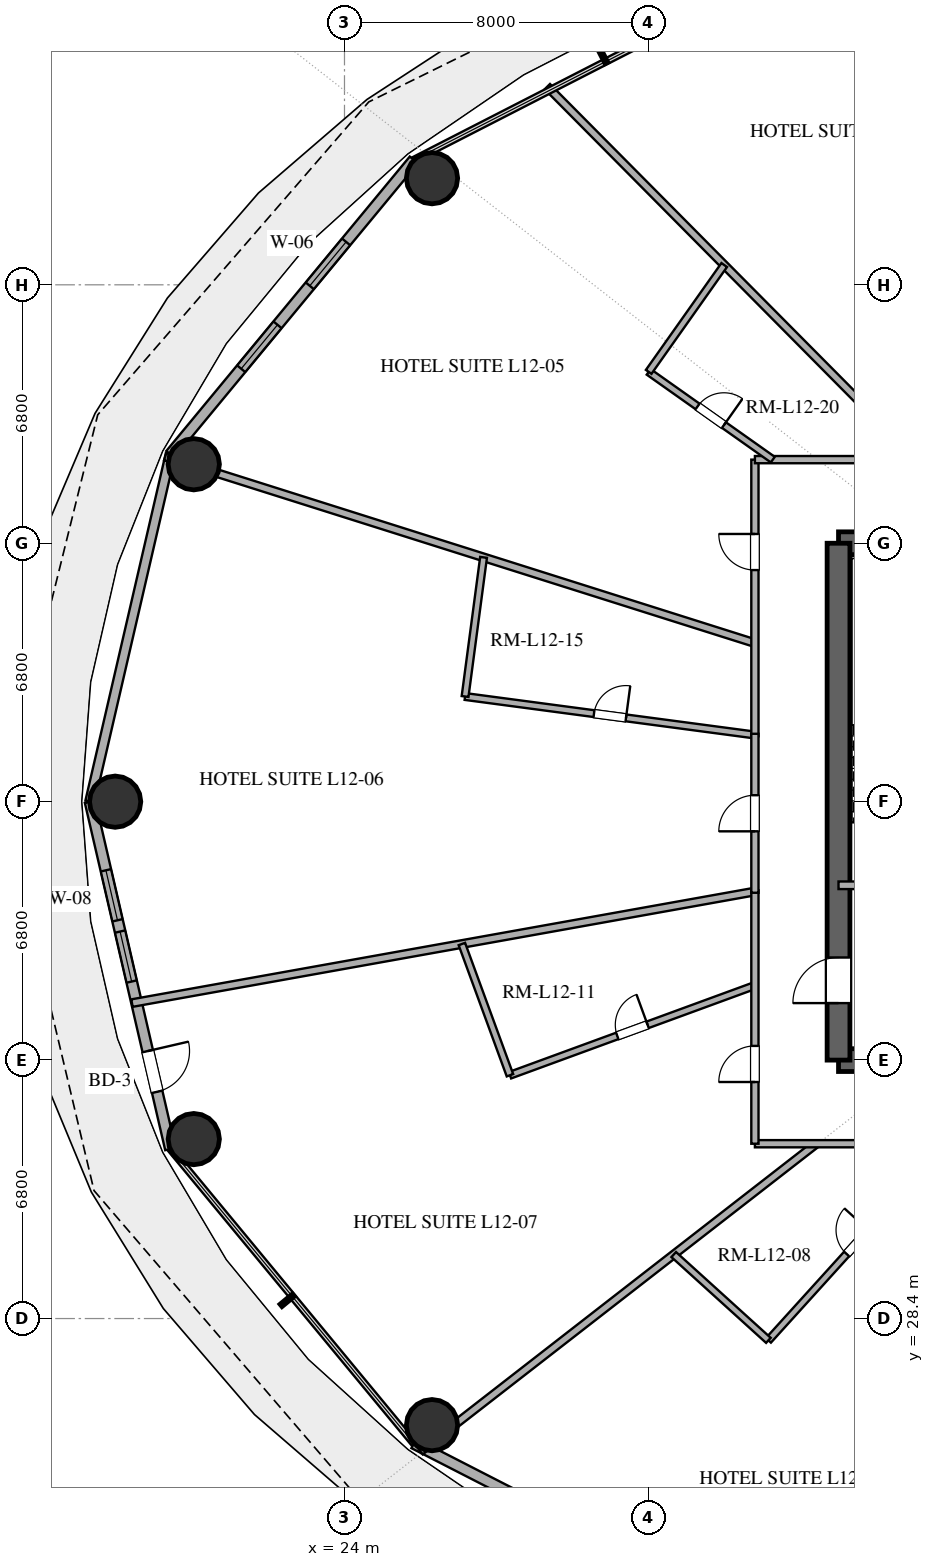
"""IFC4 building model, lengths in metres.
Left out: names, types, materials, properties, quantities, classifications, styles, units other than length and angle.
Written with IfcOpenShell. Run it as: python <this file> out.ifc"""

import sys

from ifc_helpers import new_model, si_unit, direction, frame, frame_2d, origin, origin_2d, place, context, subcontext, project, spatial, rectangle, hollow_circle, extrude, element, fill, save


model = new_model("IFC4")
c1 = context("Model", 3, precision=1e-05, world=origin(), true_north=direction((0.0, 1.0)))
c2 = subcontext(c1, "Body", "Model", "MODEL_VIEW")
j1 = project(units=[si_unit("LENGTHUNIT", "METRE"), si_unit("PLANEANGLEUNIT", "RADIAN")], contexts=[c1])
p1 = place(None, origin())
s1 = spatial("IfcSite", under=j1, at=p1, CompositionType="ELEMENT")
p2 = place(p1, origin())
s2 = spatial("IfcBuilding", under=s1, at=p2, CompositionType="ELEMENT")
p3 = place(p2, frame((0.0, 0.0, 53.4)))
s3 = spatial("IfcBuildingStorey", under=s2, at=p3, CompositionType="ELEMENT", Elevation=53.4)
for number, where, z_axis, x_axis in (
    (1, (37.0, 35.2, 0.0), (0.0, 0.0, 1.0), (1.0, 0.0, 0.0)),
    (2, (37.0, 48.8, 0.0), (0.0, 0.0, 1.0), (1.0, 0.0, 0.0)),
):
    element("IfcWall", number, at=place(p3, frame(where, z_axis=z_axis, x_axis=x_axis)), inside=s3, PredefinedType="SHEAR", context=c2, shape_type="SweptSolid", body=[
        extrude(rectangle(XDim=4.0, YDim=0.6, at=frame_2d((2.0, 0.0))), origin(), (0.0, 0.0, 1.0), 3.38),
    ])
p4 = place(p3, frame((37.0, 35.2, 0.0), z_axis=(0.0, 0.0, 1.0), x_axis=(0.0, 1.0, 0.0)))
e3 = element("IfcWall", 3, at=p4, inside=s3, PredefinedType="SHEAR", context=c2, shape_type="SweptSolid", body=[
    extrude(rectangle(XDim=13.6, YDim=0.6, at=frame_2d((6.8, 0.0))), origin(), (0.0, 0.0, 1.0), 3.38),
])
p5 = place(p4, frame((1.5, 0.0, 0.0)))
e4 = element("IfcOpeningElement", 4, at=p5, cuts=e3, PredefinedType="OPENING", context=c2, shape_type="SweptSolid", body=[
    extrude(rectangle(XDim=1.2, YDim=2.15, at=frame_2d((0.6, 1.075))), frame((0.0, 0.31, 0.0), z_axis=(0.0, -1.0, 0.0), x_axis=(1.0, 0.0, 0.0)), (0.0, 0.0, 1.0), 0.62),
])
for number, where, z_axis, x_axis in (
    (5, (26.303, 58.405, 0.0), (0.0, 0.0, 1.0), (1.0, 0.0, 0.0)),
    (6, (20.034, 50.878, 0.0), (0.0, 0.0, 1.0), (1.0, 0.0, 0.0)),
    (7, (17.965, 42.0, 0.0), (0.0, 0.0, 1.0), (1.0, 0.0, 0.0)),
    (8, (20.034, 33.122, 0.0), (0.0, 0.0, 1.0), (1.0, 0.0, 0.0)),
    (9, (26.303, 25.595, 0.0), (0.0, 0.0, 1.0), (1.0, 0.0, 0.0)),
):
    element("IfcColumn", number, at=place(p3, frame(where, z_axis=z_axis, x_axis=x_axis)), inside=s3, PredefinedType="COLUMN", context=c2, shape_type="SweptSolid", body=[
        extrude(hollow_circle(Radius=0.675, WallThickness=0.036, at=origin_2d()), origin(), (0.0, 0.0, 1.0), 3.38),
    ])
p6 = place(p3, frame((25.826, 58.886, 0.0), z_axis=(0.0, 0.0, 1.0), x_axis=(-0.637296809613, -0.770618437657, 0.0)))
e10 = element("IfcWall", 10, at=p6, inside=s3, PredefinedType="SOLIDWALL", context=c2, shape_type="SweptSolid", body=[
    extrude(rectangle(XDim=10.053, YDim=0.28, at=frame_2d((5.027, 0.0))), origin(), (0.0, 0.0, 1.0), 3.38),
])
p7 = place(p6, frame((2.798, 0.0, 0.85)))
e11 = element("IfcOpeningElement", 11, at=p7, cuts=e10, PredefinedType="OPENING", context=c2, shape_type="SweptSolid", body=[
    extrude(rectangle(XDim=1.5, YDim=2.0, at=frame_2d((0.75, 1.0))), frame((0.0, 0.15, 0.0), z_axis=(0.0, -1.0, 0.0), x_axis=(1.0, 0.0, 0.0)), (0.0, 0.0, 1.0), 0.3),
])
p8 = place(p6, frame((5.63, 0.0, 0.85)))
e12 = element("IfcOpeningElement", 12, at=p8, cuts=e10, PredefinedType="OPENING", context=c2, shape_type="SweptSolid", body=[
    extrude(rectangle(XDim=1.5, YDim=2.0, at=frame_2d((0.75, 1.0))), frame((0.0, 0.15, 0.0), z_axis=(0.0, -1.0, 0.0), x_axis=(1.0, 0.0, 0.0)), (0.0, 0.0, 1.0), 0.3),
])
p9 = place(p3, frame((19.419, 51.138, 0.0), z_axis=(0.0, 0.0, 1.0), x_axis=(-0.225454452941, -0.974253709076, 0.0)))
e13 = element("IfcWall", 13, at=p9, inside=s3, PredefinedType="SOLIDWALL", context=c2, shape_type="SweptSolid", body=[
    extrude(rectangle(XDim=9.38, YDim=0.25, at=frame_2d((4.69, 0.0))), origin(), (0.0, 0.0, 1.0), 3.38),
])
p10 = place(p3, frame((17.304, 42.0, 0.0), z_axis=(0.0, 0.0, 1.0), x_axis=(0.225454452941, -0.974253709076, 0.0)))
e14 = element("IfcWall", 14, at=p10, inside=s3, PredefinedType="SOLIDWALL", context=c2, shape_type="SweptSolid", body=[
    extrude(rectangle(XDim=9.38, YDim=0.28, at=frame_2d((4.69, 0.0))), origin(), (0.0, 0.0, 1.0), 3.38),
])
p11 = place(p10, frame((1.854, 0.0, 0.85)))
e15 = element("IfcOpeningElement", 15, at=p11, cuts=e14, PredefinedType="OPENING", context=c2, shape_type="SweptSolid", body=[
    extrude(rectangle(XDim=1.35, YDim=1.8, at=frame_2d((0.675, 0.9))), frame((0.0, 0.15, 0.0), z_axis=(0.0, -1.0, 0.0), x_axis=(1.0, 0.0, 0.0)), (0.0, 0.0, 1.0), 0.3),
])
p12 = place(p10, frame((3.508, 0.0, 0.85)))
e16 = element("IfcOpeningElement", 16, at=p12, cuts=e14, PredefinedType="OPENING", context=c2, shape_type="SweptSolid", body=[
    extrude(rectangle(XDim=1.35, YDim=1.8, at=frame_2d((0.675, 0.9))), frame((0.0, 0.15, 0.0), z_axis=(0.0, -1.0, 0.0), x_axis=(1.0, 0.0, 0.0)), (0.0, 0.0, 1.0), 0.3),
])
p13 = place(p10, frame((6.735, 0.0, 0.0)))
e17 = element("IfcOpeningElement", 17, at=p13, cuts=e14, PredefinedType="OPENING", context=c2, shape_type="SweptSolid", body=[
    extrude(rectangle(XDim=1.1, YDim=2.25, at=frame_2d((0.55, 1.125))), frame((0.0, 0.15, 0.0), z_axis=(0.0, -1.0, 0.0), x_axis=(1.0, 0.0, 0.0)), (0.0, 0.0, 1.0), 0.3),
])
p14 = place(p3, frame((25.826, 25.114, 0.0), z_axis=(0.0, 0.0, 1.0), x_axis=(0.889853976658, -0.456245438581, 0.0)))
e18 = element("IfcWall", 18, at=p14, inside=s3, PredefinedType="SOLIDWALL", context=c2, shape_type="SweptSolid", body=[
    extrude(rectangle(XDim=11.346, YDim=0.28, at=frame_2d((5.673, 0.0))), origin(), (0.0, 0.0, 1.0), 3.38),
])
p15 = place(p14, frame((3.567, 0.0, 0.85)))
e19 = element("IfcOpeningElement", 19, at=p15, cuts=e18, PredefinedType="OPENING", context=c2, shape_type="SweptSolid", body=[
    extrude(rectangle(XDim=1.2, YDim=1.6, at=frame_2d((0.6, 0.8))), frame((0.0, 0.15, 0.0), z_axis=(0.0, -1.0, 0.0), x_axis=(1.0, 0.0, 0.0)), (0.0, 0.0, 1.0), 0.3),
])
p16 = place(p14, frame((6.729, 0.0, 0.85)))
e20 = element("IfcOpeningElement", 20, at=p16, cuts=e18, PredefinedType="OPENING", context=c2, shape_type="SweptSolid", body=[
    extrude(rectangle(XDim=1.2, YDim=1.6, at=frame_2d((0.6, 0.8))), frame((0.0, 0.15, 0.0), z_axis=(0.0, -1.0, 0.0), x_axis=(1.0, 0.0, 0.0)), (0.0, 0.0, 1.0), 0.3),
])
p17 = place(p3, frame((37.0, 39.8, 0.0), z_axis=(0.0, 0.0, 1.0), x_axis=(1.0, 0.0, 0.0)))
e21 = element("IfcWall", 21, at=p17, inside=s3, PredefinedType="SOLIDWALL", context=c2, shape_type="SweptSolid", body=[
    extrude(rectangle(XDim=4.0, YDim=0.2, at=frame_2d((2.0, 0.0))), origin(), (0.0, 0.0, 1.0), 2.74),
])
p18 = place(p17, frame((1.45, 0.0, 0.0)))
e22 = element("IfcOpeningElement", 22, at=p18, cuts=e21, PredefinedType="OPENING", context=c2, shape_type="SweptSolid", body=[
    extrude(rectangle(XDim=1.1, YDim=2.15, at=frame_2d((0.55, 1.075))), frame((0.0, 0.11, 0.0), z_axis=(0.0, -1.0, 0.0), x_axis=(1.0, 0.0, 0.0)), (0.0, 0.0, 1.0), 0.22),
])
p19 = place(p3, frame((34.8, 39.636, 0.0), z_axis=(0.0, 0.0, 1.0), x_axis=(-0.984338200058, -0.176290407871, 0.0)))
e23 = element("IfcWall", 23, at=p19, inside=s3, PredefinedType="PARTITIONING", context=c2, shape_type="SweptSolid", body=[
    extrude(rectangle(XDim=16.653, YDim=0.2, at=frame_2d((8.327, 0.0))), origin(), (0.0, 0.0, 1.0), 2.74),
])
p20 = place(p3, frame((34.8, 46.172, 0.0), z_axis=(0.0, 0.0, 1.0), x_axis=(-0.953511676516, 0.301356073023, 0.0)))
e24 = element("IfcWall", 24, at=p20, inside=s3, PredefinedType="PARTITIONING", context=c2, shape_type="SweptSolid", body=[
    extrude(rectangle(XDim=16.275, YDim=0.2, at=frame_2d((8.137, 0.0))), origin(), (0.0, 0.0, 1.0), 2.74),
])
p21 = place(p3, frame((36.417, 33.0, 0.0), z_axis=(0.0, 0.0, 1.0), x_axis=(-0.789656987139, -0.613548565855, 0.0)))
e25 = element("IfcWall", 25, at=p21, inside=s3, PredefinedType="PARTITIONING", context=c2, shape_type="SweptSolid", body=[
    extrude(rectangle(XDim=13.195, YDim=0.2, at=frame_2d((6.597, 0.0))), origin(), (0.0, 0.0, 1.0), 2.74),
])
p22 = place(p3, frame((27.173, 44.768, 0.0), z_axis=(0.0, 0.0, 1.0), x_axis=(0.991283239225, -0.131748015661, 0.0)))
e26 = element("IfcWall", 26, at=p22, inside=s3, PredefinedType="PLUMBINGWALL", context=c2, shape_type="SweptSolid", body=[
    extrude(rectangle(XDim=7.694, YDim=0.18, at=frame_2d((3.847, 0.0))), origin(), (0.0, 0.0, 1.0), 2.74),
])
p23 = place(p22, frame((3.422, 0.0, 0.0)))
e27 = element("IfcOpeningElement", 27, at=p23, cuts=e26, PredefinedType="OPENING", context=c2, shape_type="SweptSolid", body=[
    extrude(rectangle(XDim=0.85, YDim=2.1, at=frame_2d((0.425, 1.05))), frame((0.0, 0.1, 0.0), z_axis=(0.0, -1.0, 0.0), x_axis=(1.0, 0.0, 0.0)), (0.0, 0.0, 1.0), 0.2),
])
p24 = place(p3, frame((39.072, 51.0, 0.0), z_axis=(0.0, 0.0, 1.0), x_axis=(-0.704257683765, 0.70994444491, 0.0)))
e28 = element("IfcWall", 28, at=p24, inside=s3, PredefinedType="PARTITIONING", context=c2, shape_type="SweptSolid", body=[
    extrude(rectangle(XDim=13.824, YDim=0.2, at=frame_2d((6.912, 0.0))), origin(), (0.0, 0.0, 1.0), 2.74),
])
p25 = place(p3, frame((35.155, 27.826, 0.0), z_axis=(0.0, 0.0, 1.0), x_axis=(0.671533822983, 0.740973902773, 0.0)))
e29 = element("IfcWall", 29, at=p25, inside=s3, PredefinedType="PLUMBINGWALL", context=c2, shape_type="SweptSolid", body=[
    extrude(rectangle(XDim=6.982, YDim=0.18, at=frame_2d((3.491, 0.0))), origin(), (0.0, 0.0, 1.0), 2.74),
])
p26 = place(p25, frame((3.066, 0.0, 0.0)))
e30 = element("IfcOpeningElement", 30, at=p26, cuts=e29, PredefinedType="OPENING", context=c2, shape_type="SweptSolid", body=[
    extrude(rectangle(XDim=0.85, YDim=2.1, at=frame_2d((0.425, 1.05))), frame((0.0, 0.1, 0.0), z_axis=(0.0, -1.0, 0.0), x_axis=(1.0, 0.0, 0.0)), (0.0, 0.0, 1.0), 0.2),
])
p27 = place(p3, frame((28.354, 34.802, 0.0), z_axis=(0.0, 0.0, 1.0), x_axis=(0.938953689431, 0.344043556986, 0.0)))
e31 = element("IfcWall", 31, at=p27, inside=s3, PredefinedType="PLUMBINGWALL", context=c2, shape_type="SweptSolid", body=[
    extrude(rectangle(XDim=6.865, YDim=0.18, at=frame_2d((3.433, 0.0))), origin(), (0.0, 0.0, 1.0), 2.74),
])
p28 = place(p27, frame((3.007, 0.0, 0.0)))
e32 = element("IfcOpeningElement", 32, at=p28, cuts=e31, PredefinedType="OPENING", context=c2, shape_type="SweptSolid", body=[
    extrude(rectangle(XDim=0.85, YDim=2.1, at=frame_2d((0.425, 1.05))), frame((0.0, 0.1, 0.0), z_axis=(0.0, -1.0, 0.0), x_axis=(1.0, 0.0, 0.0)), (0.0, 0.0, 1.0), 0.2),
])
p29 = place(p3, frame((34.8, 43.722, 0.0), z_axis=(0.0, 0.0, 1.0), x_axis=(0.0, 1.0, 0.0)))
e33 = element("IfcWall", 33, at=p29, inside=s3, PredefinedType="PARTITIONING", context=c2, shape_type="SweptSolid", body=[
    extrude(rectangle(XDim=7.278, YDim=0.19, at=frame_2d((3.639, 0.0))), origin(), (0.0, 0.0, 1.0), 2.74),
])
p30 = place(p29, frame((4.372, 0.0, 0.0)))
e34 = element("IfcOpeningElement", 34, at=p30, cuts=e33, PredefinedType="OPENING", context=c2, shape_type="SweptSolid", body=[
    extrude(rectangle(XDim=0.95, YDim=2.15, at=frame_2d((0.475, 1.075))), frame((0.0, 0.105, 0.0), z_axis=(0.0, -1.0, 0.0), x_axis=(1.0, 0.0, 0.0)), (0.0, 0.0, 1.0), 0.21),
])
p31 = place(p3, frame((50.144, 33.0, 0.0), z_axis=(0.0, 0.0, 1.0), x_axis=(-1.0, 0.0, 0.0)))
e35 = element("IfcWall", 35, at=p31, inside=s3, PredefinedType="PARTITIONING", context=c2, shape_type="SweptSolid", body=[
    extrude(rectangle(XDim=15.344, YDim=0.19, at=frame_2d((7.672, 0.0))), origin(), (0.0, 0.0, 1.0), 2.74),
])
p32 = place(p31, frame((3.438, 0.0, 0.0)))
e36 = element("IfcOpeningElement", 36, at=p32, cuts=e35, PredefinedType="OPENING", context=c2, shape_type="SweptSolid", body=[
    extrude(rectangle(XDim=1.0, YDim=2.2, at=frame_2d((0.5, 1.1))), frame((0.0, 0.105, 0.0), z_axis=(0.0, -1.0, 0.0), x_axis=(1.0, 0.0, 0.0)), (0.0, 0.0, 1.0), 0.21),
])
p33 = place(p31, frame((7.798, 0.0, 0.0)))
e37 = element("IfcOpeningElement", 37, at=p33, cuts=e35, PredefinedType="OPENING", context=c2, shape_type="SweptSolid", body=[
    extrude(rectangle(XDim=0.95, YDim=2.15, at=frame_2d((0.475, 1.075))), frame((0.0, 0.105, 0.0), z_axis=(0.0, -1.0, 0.0), x_axis=(1.0, 0.0, 0.0)), (0.0, 0.0, 1.0), 0.21),
])
p34 = place(p3, frame((34.8, 51.0, 0.0), z_axis=(0.0, 0.0, 1.0), x_axis=(1.0, 0.0, 0.0)))
e38 = element("IfcWall", 38, at=p34, inside=s3, PredefinedType="PARTITIONING", context=c2, shape_type="SweptSolid", body=[
    extrude(rectangle(XDim=8.641, YDim=0.19, at=frame_2d((4.32, 0.0))), origin(), (0.0, 0.0, 1.0), 2.74),
])
p35 = place(p34, frame((5.959, 0.0, 0.0)))
e39 = element("IfcOpeningElement", 39, at=p35, cuts=e38, PredefinedType="OPENING", context=c2, shape_type="SweptSolid", body=[
    extrude(rectangle(XDim=0.95, YDim=2.15, at=frame_2d((0.475, 1.075))), frame((0.0, 0.105, 0.0), z_axis=(0.0, -1.0, 0.0), x_axis=(1.0, 0.0, 0.0)), (0.0, 0.0, 1.0), 0.21),
])
p36 = place(p3, frame((34.8, 33.0, 0.0), z_axis=(0.0, 0.0, 1.0), x_axis=(0.0, 1.0, 0.0)))
e40 = element("IfcWall", 40, at=p36, inside=s3, PredefinedType="PARTITIONING", context=c2, shape_type="SweptSolid", body=[
    extrude(rectangle(XDim=6.668, YDim=0.19, at=frame_2d((3.334, 0.0))), origin(), (0.0, 0.0, 1.0), 2.74),
])
p37 = place(p36, frame((1.624, 0.0, 0.0)))
e41 = element("IfcOpeningElement", 41, at=p37, cuts=e40, PredefinedType="OPENING", context=c2, shape_type="SweptSolid", body=[
    extrude(rectangle(XDim=0.95, YDim=2.15, at=frame_2d((0.475, 1.075))), frame((0.0, 0.105, 0.0), z_axis=(0.0, -1.0, 0.0), x_axis=(1.0, 0.0, 0.0)), (0.0, 0.0, 1.0), 0.21),
])
p38 = place(p3, frame((34.8, 39.604, 0.0), z_axis=(0.0, 0.0, 1.0), x_axis=(0.0, 1.0, 0.0)))
e42 = element("IfcWall", 42, at=p38, inside=s3, PredefinedType="PARTITIONING", context=c2, shape_type="SweptSolid", body=[
    extrude(rectangle(XDim=4.183, YDim=0.19, at=frame_2d((2.091, 0.0))), origin(), (0.0, 0.0, 1.0), 2.74),
])
p39 = place(p38, frame((1.616, 0.0, 0.0)))
e43 = element("IfcOpeningElement", 43, at=p39, cuts=e42, PredefinedType="OPENING", context=c2, shape_type="SweptSolid", body=[
    extrude(rectangle(XDim=0.95, YDim=2.15, at=frame_2d((0.475, 1.075))), frame((0.0, 0.105, 0.0), z_axis=(0.0, -1.0, 0.0), x_axis=(1.0, 0.0, 0.0)), (0.0, 0.0, 1.0), 0.21),
])
p40 = place(p3, frame((32.005, 53.309, 0.0), z_axis=(0.0, 0.0, 1.0), x_axis=(0.816524416543, -0.577310901672, 0.0)))
e44 = element("IfcWall", 44, at=p40, inside=s3, PredefinedType="PLUMBINGWALL", context=c2, shape_type="SweptSolid", body=[
    extrude(rectangle(XDim=4.0, YDim=0.18, at=frame_2d((2.0, 0.0))), origin(), (0.0, 0.0, 1.0), 2.74),
])
p41 = place(p40, frame((1.575, 0.0, 0.0)))
e45 = element("IfcOpeningElement", 45, at=p41, cuts=e44, PredefinedType="OPENING", context=c2, shape_type="SweptSolid", body=[
    extrude(rectangle(XDim=0.85, YDim=2.1, at=frame_2d((0.425, 1.05))), frame((0.0, 0.1, 0.0), z_axis=(0.0, -1.0, 0.0), x_axis=(1.0, 0.0, 0.0)), (0.0, 0.0, 1.0), 0.2),
])
p42 = place(p3, frame((27.66, 48.428, 0.0), z_axis=(0.0, 0.0, 1.0), x_axis=(-0.131760975246, -0.991281516726, 0.0)))
e46 = element("IfcWall", 46, at=p42, inside=s3, PredefinedType="PLUMBINGWALL", context=c2, shape_type="SweptSolid", body=[
    extrude(rectangle(XDim=3.693, YDim=0.18, at=frame_2d((1.846, 0.0))), origin(), (0.0, 0.0, 1.0), 2.74),
])
p43 = place(p3, frame((27.089, 38.255, 0.0), z_axis=(0.0, 0.0, 1.0), x_axis=(0.344012760863, -0.938964972916, 0.0)))
e47 = element("IfcWall", 47, at=p43, inside=s3, PredefinedType="PLUMBINGWALL", context=c2, shape_type="SweptSolid", body=[
    extrude(rectangle(XDim=3.677, YDim=0.18, at=frame_2d((1.839, 0.0))), origin(), (0.0, 0.0, 1.0), 2.74),
])
p44 = place(p3, frame((33.993, 56.121, 0.0), z_axis=(0.0, 0.0, 1.0), x_axis=(-0.57730102799, -0.816531397487, 0.0)))
e48 = element("IfcWall", 48, at=p44, inside=s3, PredefinedType="PLUMBINGWALL", context=c2, shape_type="SweptSolid", body=[
    extrude(rectangle(XDim=3.443, YDim=0.18, at=frame_2d((1.722, 0.0))), origin(), (0.0, 0.0, 1.0), 2.74),
])
p45 = place(p3, frame((32.664, 30.084, 0.0), z_axis=(0.0, 0.0, 1.0), x_axis=(0.740964368308, -0.67154434321, 0.0)))
e49 = element("IfcWall", 49, at=p45, inside=s3, PredefinedType="PLUMBINGWALL", context=c2, shape_type="SweptSolid", body=[
    extrude(rectangle(XDim=3.362, YDim=0.18, at=frame_2d((1.681, 0.0))), origin(), (0.0, 0.0, 1.0), 2.74),
])
p46 = place(p7, origin())
e50 = element("IfcWindow", 50, at=p46, inside=s3, PartitioningType="SINGLE_PANEL", PredefinedType="WINDOW", context=c2, shape_type="SweptSolid", body=[
    extrude(rectangle(XDim=1.5, YDim=2.0, at=frame_2d((0.75, 1.0))), frame((0.0, 0.03, 0.0), z_axis=(0.0, -1.0, 0.0), x_axis=(1.0, 0.0, 0.0)), (0.0, 0.0, 1.0), 0.06),
])
fill(e11, e50)
p47 = place(p8, origin())
e51 = element("IfcWindow", 51, at=p47, inside=s3, PartitioningType="SINGLE_PANEL", PredefinedType="WINDOW", context=c2, shape_type="SweptSolid", body=[
    extrude(rectangle(XDim=1.5, YDim=2.0, at=frame_2d((0.75, 1.0))), frame((0.0, 0.03, 0.0), z_axis=(0.0, -1.0, 0.0), x_axis=(1.0, 0.0, 0.0)), (0.0, 0.0, 1.0), 0.06),
])
fill(e12, e51)
p48 = place(p11, origin())
e52 = element("IfcWindow", 52, at=p48, inside=s3, PartitioningType="SINGLE_PANEL", PredefinedType="WINDOW", context=c2, shape_type="SweptSolid", body=[
    extrude(rectangle(XDim=1.35, YDim=1.8, at=frame_2d((0.675, 0.9))), frame((0.0, 0.03, 0.0), z_axis=(0.0, -1.0, 0.0), x_axis=(1.0, 0.0, 0.0)), (0.0, 0.0, 1.0), 0.06),
])
fill(e15, e52)
p49 = place(p12, origin())
e53 = element("IfcWindow", 53, at=p49, inside=s3, PartitioningType="SINGLE_PANEL", PredefinedType="WINDOW", context=c2, shape_type="SweptSolid", body=[
    extrude(rectangle(XDim=1.35, YDim=1.8, at=frame_2d((0.675, 0.9))), frame((0.0, 0.03, 0.0), z_axis=(0.0, -1.0, 0.0), x_axis=(1.0, 0.0, 0.0)), (0.0, 0.0, 1.0), 0.06),
])
fill(e16, e53)
p50 = place(p13, origin())
e54 = element("IfcDoor", 54, at=p50, inside=s3, OperationType="SINGLE_SWING_LEFT", PredefinedType="DOOR", context=c2, shape_type="SweptSolid", body=[
    extrude(rectangle(XDim=1.1, YDim=2.25, at=frame_2d((0.55, 1.125))), frame((0.0, 0.025, 0.0), z_axis=(0.0, -1.0, 0.0), x_axis=(1.0, 0.0, 0.0)), (0.0, 0.0, 1.0), 0.05),
])
fill(e17, e54)
p51 = place(p5, origin())
e55 = element("IfcDoor", 55, at=p51, inside=s3, OperationType="SINGLE_SWING_LEFT", PredefinedType="DOOR", context=c2, shape_type="SweptSolid", body=[
    extrude(rectangle(XDim=1.2, YDim=2.15, at=frame_2d((0.6, 1.075))), frame((0.0, 0.025, 0.0), z_axis=(0.0, -1.0, 0.0), x_axis=(1.0, 0.0, 0.0)), (0.0, 0.0, 1.0), 0.05),
])
fill(e4, e55)
p52 = place(p23, origin())
e56 = element("IfcDoor", 56, at=p52, inside=s3, OperationType="SINGLE_SWING_RIGHT", PredefinedType="DOOR", context=c2, shape_type="SweptSolid", body=[
    extrude(rectangle(XDim=0.85, YDim=2.1, at=frame_2d((0.425, 1.05))), frame((0.0, 0.025, 0.0), z_axis=(0.0, -1.0, 0.0), x_axis=(1.0, 0.0, 0.0)), (0.0, 0.0, 1.0), 0.05),
])
fill(e27, e56)
p53 = place(p26, origin())
e57 = element("IfcDoor", 57, at=p53, inside=s3, OperationType="SINGLE_SWING_RIGHT", PredefinedType="DOOR", context=c2, shape_type="SweptSolid", body=[
    extrude(rectangle(XDim=0.85, YDim=2.1, at=frame_2d((0.425, 1.05))), frame((0.0, 0.025, 0.0), z_axis=(0.0, -1.0, 0.0), x_axis=(1.0, 0.0, 0.0)), (0.0, 0.0, 1.0), 0.05),
])
fill(e30, e57)
p54 = place(p28, origin())
e58 = element("IfcDoor", 58, at=p54, inside=s3, OperationType="SINGLE_SWING_RIGHT", PredefinedType="DOOR", context=c2, shape_type="SweptSolid", body=[
    extrude(rectangle(XDim=0.85, YDim=2.1, at=frame_2d((0.425, 1.05))), frame((0.0, 0.025, 0.0), z_axis=(0.0, -1.0, 0.0), x_axis=(1.0, 0.0, 0.0)), (0.0, 0.0, 1.0), 0.05),
])
fill(e32, e58)
p55 = place(p30, origin())
e59 = element("IfcDoor", 59, at=p55, inside=s3, OperationType="SINGLE_SWING_RIGHT", PredefinedType="DOOR", context=c2, shape_type="SweptSolid", body=[
    extrude(rectangle(XDim=0.95, YDim=2.15, at=frame_2d((0.475, 1.075))), frame((0.0, 0.025, 0.0), z_axis=(0.0, -1.0, 0.0), x_axis=(1.0, 0.0, 0.0)), (0.0, 0.0, 1.0), 0.05),
])
fill(e34, e59)
p56 = place(p37, origin())
e60 = element("IfcDoor", 60, at=p56, inside=s3, OperationType="SINGLE_SWING_LEFT", PredefinedType="DOOR", context=c2, shape_type="SweptSolid", body=[
    extrude(rectangle(XDim=0.95, YDim=2.15, at=frame_2d((0.475, 1.075))), frame((0.0, 0.025, 0.0), z_axis=(0.0, -1.0, 0.0), x_axis=(1.0, 0.0, 0.0)), (0.0, 0.0, 1.0), 0.05),
])
fill(e41, e60)
p57 = place(p39, origin())
e61 = element("IfcDoor", 61, at=p57, inside=s3, OperationType="SINGLE_SWING_LEFT", PredefinedType="DOOR", context=c2, shape_type="SweptSolid", body=[
    extrude(rectangle(XDim=0.95, YDim=2.15, at=frame_2d((0.475, 1.075))), frame((0.0, 0.025, 0.0), z_axis=(0.0, -1.0, 0.0), x_axis=(1.0, 0.0, 0.0)), (0.0, 0.0, 1.0), 0.05),
])
fill(e43, e61)
p58 = place(p41, origin())
e62 = element("IfcDoor", 62, at=p58, inside=s3, OperationType="SINGLE_SWING_RIGHT", PredefinedType="DOOR", context=c2, shape_type="SweptSolid", body=[
    extrude(rectangle(XDim=0.85, YDim=2.1, at=frame_2d((0.425, 1.05))), frame((0.0, 0.025, 0.0), z_axis=(0.0, -1.0, 0.0), x_axis=(1.0, 0.0, 0.0)), (0.0, 0.0, 1.0), 0.05),
])
fill(e45, e62)
save(model, sys.argv[1])
